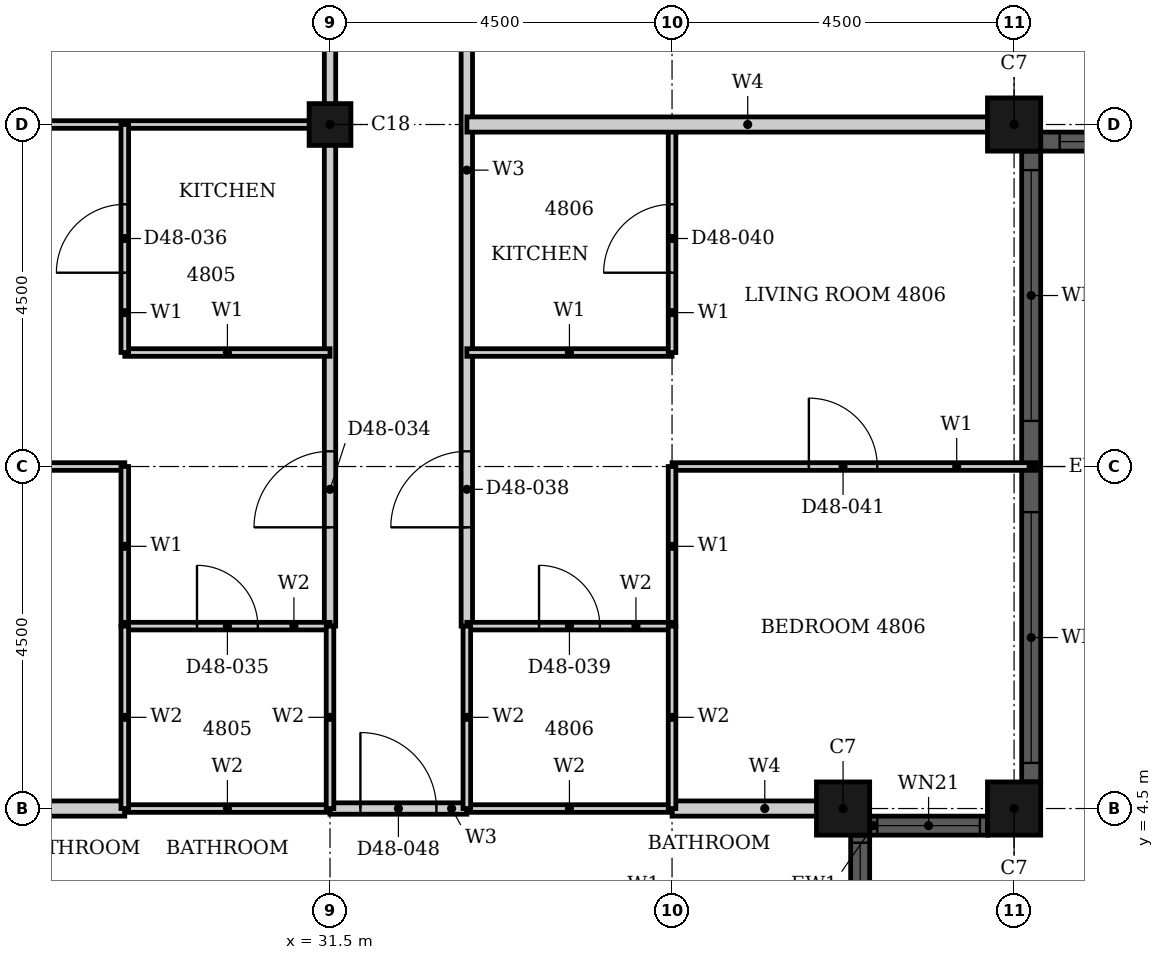
"""IFC4 building model, lengths in metres.
Left out: names, types, materials, properties, quantities, classifications, styles, units other than length and angle.
Written with IfcOpenShell. Run it as: python <this file> out.ifc"""

import sys

from ifc_helpers import new_model, si_unit, direction, frame, frame_2d, origin, origin_2d, place, context, subcontext, project, spatial, rectangle, hollow_rectangle, extrude, element, fill, save


model = new_model("IFC4")
c1 = context("Model", 3, precision=1e-05, world=origin(), true_north=direction((0.0, 1.0)))
c2 = subcontext(c1, "Body", "Model", "MODEL_VIEW")
j1 = project(units=[si_unit("LENGTHUNIT", "METRE"), si_unit("PLANEANGLEUNIT", "RADIAN")], contexts=[c1])
p1 = place(None, origin())
s1 = spatial("IfcSite", under=j1, at=p1, CompositionType="ELEMENT")
p2 = place(p1, origin())
s2 = spatial("IfcBuilding", under=s1, at=p2, CompositionType="ELEMENT")
p3 = place(p2, frame((0.0, 0.0, 192.4)))
s3 = spatial("IfcBuildingStorey", under=s2, at=p3, CompositionType="ELEMENT", Elevation=192.4)
for number, where, z_axis, x_axis in (
    (1, (40.5, 13.5, 0.0), (0.0, 0.0, 1.0), (1.0, 0.0, 0.0)),
    (2, (38.25, 4.5, 0.0), (0.0, 0.0, 1.0), (1.0, 0.0, 0.0)),
    (3, (40.5, 4.5, 0.0), (0.0, 0.0, 1.0), (1.0, 0.0, 0.0)),
):
    element("IfcColumn", number, at=place(p3, frame(where, z_axis=z_axis, x_axis=x_axis)), inside=s3, PredefinedType="COLUMN", context=c2, shape_type="SweptSolid", body=[
        extrude(hollow_rectangle(XDim=0.7, YDim=0.7, WallThickness=0.022, at=origin_2d()), origin(), (0.0, 0.0, 1.0), 3.7),
    ])
p4 = place(p3, frame((31.5, 13.5, 0.0), z_axis=(0.0, 0.0, 1.0), x_axis=(1.0, 0.0, 0.0)))
e4 = element("IfcColumn", 4, at=p4, inside=s3, PredefinedType="COLUMN", context=c2, shape_type="SweptSolid", body=[
    extrude(hollow_rectangle(XDim=0.55, YDim=0.55, WallThickness=0.018, at=origin_2d()), origin(), (0.0, 0.0, 1.0), 3.7),
])
p5 = place(p3, frame((40.85, 13.275, 0.0), z_axis=(0.0, 0.0, 1.0), x_axis=(1.0, 0.0, 0.0)))
e5 = element("IfcWall", 5, at=p5, inside=s3, PredefinedType="SOLIDWALL", context=c2, shape_type="SweptSolid", body=[
    extrude(rectangle(XDim=3.8, YDim=0.25, at=frame_2d((1.9, 0.0))), origin(), (0.0, 0.0, 1.0), 3.7),
])
p6 = place(p5, frame((0.25, 0.0, 0.45)))
e6 = element("IfcOpeningElement", 6, at=p6, cuts=e5, PredefinedType="OPENING", context=c2, shape_type="SweptSolid", body=[
    extrude(rectangle(XDim=3.3, YDim=2.3, at=frame_2d((1.65, 1.15))), frame((0.0, 0.135, 0.0), z_axis=(0.0, -1.0, 0.0), x_axis=(1.0, 0.0, 0.0)), (0.0, 0.0, 1.0), 0.27),
])
p7 = place(p3, frame((38.475, 2.6, 0.0), z_axis=(0.0, 0.0, 1.0), x_axis=(0.0, 1.0, 0.0)))
e7 = element("IfcWall", 7, at=p7, inside=s3, PredefinedType="SOLIDWALL", context=c2, shape_type="SweptSolid", body=[
    extrude(rectangle(XDim=1.55, YDim=0.25, at=frame_2d((0.775, 0.0))), origin(), (0.0, 0.0, 1.0), 3.7),
])
p8 = place(p7, frame((0.1, 0.0, 0.9)))
e8 = element("IfcOpeningElement", 8, at=p8, cuts=e7, PredefinedType="OPENING", context=c2, shape_type="SweptSolid", body=[
    extrude(rectangle(XDim=1.35, YDim=1.85, at=frame_2d((0.675, 0.925))), frame((0.0, 0.135, 0.0), z_axis=(0.0, -1.0, 0.0), x_axis=(1.0, 0.0, 0.0)), (0.0, 0.0, 1.0), 0.27),
])
p9 = place(p3, frame((38.6, 4.275, 0.0), z_axis=(0.0, 0.0, 1.0), x_axis=(1.0, 0.0, 0.0)))
e9 = element("IfcWall", 9, at=p9, inside=s3, PredefinedType="SOLIDWALL", context=c2, shape_type="SweptSolid", body=[
    extrude(rectangle(XDim=1.55, YDim=0.25, at=frame_2d((0.775, 0.0))), origin(), (0.0, 0.0, 1.0), 3.7),
])
p10 = place(p9, frame((0.1, 0.0, 0.9)))
e10 = element("IfcOpeningElement", 10, at=p10, cuts=e9, PredefinedType="OPENING", context=c2, shape_type="SweptSolid", body=[
    extrude(rectangle(XDim=1.35, YDim=1.85, at=frame_2d((0.675, 0.925))), frame((0.0, 0.135, 0.0), z_axis=(0.0, -1.0, 0.0), x_axis=(1.0, 0.0, 0.0)), (0.0, 0.0, 1.0), 0.27),
])
p11 = place(p3, frame((40.725, 4.85, 0.0), z_axis=(0.0, 0.0, 1.0), x_axis=(0.0, 1.0, 0.0)))
e11 = element("IfcWall", 11, at=p11, inside=s3, PredefinedType="SOLIDWALL", context=c2, shape_type="SweptSolid", body=[
    extrude(rectangle(XDim=8.3, YDim=0.25, at=frame_2d((4.15, 0.0))), origin(), (0.0, 0.0, 1.0), 3.7),
])
p12 = place(p11, frame((0.25, 0.0, 0.45)))
e12 = element("IfcOpeningElement", 12, at=p12, cuts=e11, PredefinedType="OPENING", context=c2, shape_type="SweptSolid", body=[
    extrude(rectangle(XDim=3.3, YDim=2.3, at=frame_2d((1.65, 1.15))), frame((0.0, 0.135, 0.0), z_axis=(0.0, -1.0, 0.0), x_axis=(1.0, 0.0, 0.0)), (0.0, 0.0, 1.0), 0.27),
])
p13 = place(p11, frame((4.75, 0.0, 0.45)))
e13 = element("IfcOpeningElement", 13, at=p13, cuts=e11, PredefinedType="OPENING", context=c2, shape_type="SweptSolid", body=[
    extrude(rectangle(XDim=3.3, YDim=2.3, at=frame_2d((1.65, 1.15))), frame((0.0, 0.135, 0.0), z_axis=(0.0, -1.0, 0.0), x_axis=(1.0, 0.0, 0.0)), (0.0, 0.0, 1.0), 0.27),
])
p14 = place(p3, frame((31.5, 4.5, 0.0), z_axis=(0.0, 0.0, 1.0), x_axis=(1.0, 0.0, 0.0)))
e14 = element("IfcWall", 14, at=p14, inside=s3, PredefinedType="PARTITIONING", context=c2, shape_type="SweptSolid", body=[
    extrude(rectangle(XDim=1.8, YDim=0.15, at=frame_2d((0.9, 0.0))), origin(), (0.0, 0.0, 1.0), 3.4),
])
p15 = place(p14, frame((0.4, 0.0, 0.0)))
e15 = element("IfcOpeningElement", 15, at=p15, cuts=e14, PredefinedType="OPENING", context=c2, shape_type="SweptSolid", body=[
    extrude(rectangle(XDim=1.0, YDim=2.2, at=frame_2d((0.5, 1.1))), frame((0.0, 0.085, 0.0), z_axis=(0.0, -1.0, 0.0), x_axis=(1.0, 0.0, 0.0)), (0.0, 0.0, 1.0), 0.17),
])
p16 = place(p3, frame((31.5, 6.9, 0.0), z_axis=(0.0, 0.0, 1.0), x_axis=(0.0, 1.0, 0.0)))
e16 = element("IfcWall", 16, at=p16, inside=s3, PredefinedType="PARTITIONING", context=c2, shape_type="SweptSolid", body=[
    extrude(rectangle(XDim=13.8, YDim=0.15, at=frame_2d((6.9, 0.0))), origin(), (0.0, 0.0, 1.0), 2.68),
])
p17 = place(p16, frame((1.3, 0.0, 0.0)))
e17 = element("IfcOpeningElement", 17, at=p17, cuts=e16, PredefinedType="OPENING", context=c2, shape_type="SweptSolid", body=[
    extrude(rectangle(XDim=1.0, YDim=2.2, at=frame_2d((0.5, 1.1))), frame((0.0, 0.085, 0.0), z_axis=(0.0, -1.0, 0.0), x_axis=(1.0, 0.0, 0.0)), (0.0, 0.0, 1.0), 0.17),
])
p18 = place(p3, frame((33.3, 6.9, 0.0), z_axis=(0.0, 0.0, 1.0), x_axis=(0.0, 1.0, 0.0)))
e18 = element("IfcWall", 18, at=p18, inside=s3, PredefinedType="PARTITIONING", context=c2, shape_type="SweptSolid", body=[
    extrude(rectangle(XDim=13.799, YDim=0.15, at=frame_2d((6.899, 0.0))), origin(), (0.0, 0.0, 1.0), 3.4),
])
p19 = place(p18, frame((9.699, 0.0, 0.0)))
e19 = element("IfcOpeningElement", 19, at=p19, cuts=e18, PredefinedType="OPENING", context=c2, shape_type="SweptSolid", body=[
    extrude(rectangle(XDim=1.0, YDim=2.2, at=frame_2d((0.5, 1.1))), frame((0.0, 0.085, 0.0), z_axis=(0.0, -1.0, 0.0), x_axis=(1.0, 0.0, 0.0)), (0.0, 0.0, 1.0), 0.17),
])
p20 = place(p18, frame((1.3, 0.0, 0.0)))
e20 = element("IfcOpeningElement", 20, at=p20, cuts=e18, PredefinedType="OPENING", context=c2, shape_type="SweptSolid", body=[
    extrude(rectangle(XDim=1.0, YDim=2.2, at=frame_2d((0.5, 1.1))), frame((0.0, 0.085, 0.0), z_axis=(0.0, -1.0, 0.0), x_axis=(1.0, 0.0, 0.0)), (0.0, 0.0, 1.0), 0.17),
])
for number, where, z_axis, x_axis in (
    (21, (33.3, 10.5, 0.0), (0.0, 0.0, 1.0), (1.0, 0.0, 0.0)),
    (22, (28.8, 10.5, 0.0), (0.0, 0.0, 1.0), (1.0, 0.0, 0.0)),
):
    element("IfcWall", number, at=place(p3, frame(where, z_axis=z_axis, x_axis=x_axis)), inside=s3, PredefinedType="PARTITIONING", context=c2, shape_type="SweptSolid", body=[
        extrude(rectangle(XDim=2.7, YDim=0.1, at=frame_2d((1.35, 0.0))), origin(), (0.0, 0.0, 1.0), 3.4),
    ])
p21 = place(p3, frame((22.31, 13.5, 0.0), z_axis=(0.0, 0.0, 1.0), x_axis=(1.0, 0.0, 0.0)))
e23 = element("IfcWall", 23, at=p21, inside=s3, PredefinedType="PARTITIONING", context=c2, shape_type="SweptSolid", body=[
    extrude(rectangle(XDim=9.19, YDim=0.1, at=frame_2d((4.595, 0.0))), origin(), (0.0, 0.0, 1.0), 2.48),
])
p22 = place(p3, frame((36.0, 9.0, 0.0), z_axis=(0.0, 0.0, 1.0), x_axis=(1.0, 0.0, 0.0)))
e24 = element("IfcWall", 24, at=p22, inside=s3, PredefinedType="PARTITIONING", context=c2, shape_type="SweptSolid", body=[
    extrude(rectangle(XDim=4.79, YDim=0.1, at=frame_2d((2.395, 0.0))), origin(), (0.0, 0.0, 1.0), 3.4),
])
p23 = place(p22, frame((1.8, 0.0, 0.0)))
e25 = element("IfcOpeningElement", 25, at=p23, cuts=e24, PredefinedType="OPENING", context=c2, shape_type="SweptSolid", body=[
    extrude(rectangle(XDim=0.9, YDim=2.1, at=frame_2d((0.45, 1.05))), frame((0.0, 0.06, 0.0), z_axis=(0.0, -1.0, 0.0), x_axis=(1.0, 0.0, 0.0)), (0.0, 0.0, 1.0), 0.12),
])
p24 = place(p3, frame((22.21, 9.0, 0.0), z_axis=(0.0, 0.0, 1.0), x_axis=(1.0, 0.0, 0.0)))
e26 = element("IfcWall", 26, at=p24, inside=s3, PredefinedType="PARTITIONING", context=c2, shape_type="SweptSolid", body=[
    extrude(rectangle(XDim=6.59, YDim=0.1, at=frame_2d((3.295, 0.0))), origin(), (0.0, 0.0, 1.0), 3.4),
])
p25 = place(p24, frame((2.7, 0.0, 0.0)))
e27 = element("IfcOpeningElement", 27, at=p25, cuts=e26, PredefinedType="OPENING", context=c2, shape_type="SweptSolid", body=[
    extrude(rectangle(XDim=0.9, YDim=2.1, at=frame_2d((0.45, 1.05))), frame((0.0, 0.06, 0.0), z_axis=(0.0, -1.0, 0.0), x_axis=(1.0, 0.0, 0.0)), (0.0, 0.0, 1.0), 0.12),
])
p26 = place(p3, frame((28.8, 6.9, 0.0), z_axis=(0.0, 0.0, 1.0), x_axis=(0.0, 1.0, 0.0)))
e28 = element("IfcWall", 28, at=p26, inside=s3, PredefinedType="PARTITIONING", context=c2, shape_type="SweptSolid", body=[
    extrude(rectangle(XDim=2.1, YDim=0.1, at=frame_2d((1.05, 0.0))), origin(), (0.0, 0.0, 1.0), 3.4),
])
p27 = place(p3, frame((28.8, 10.5, 0.0), z_axis=(0.0, 0.0, 1.0), x_axis=(0.0, 1.0, 0.0)))
e29 = element("IfcWall", 29, at=p27, inside=s3, PredefinedType="PARTITIONING", context=c2, shape_type="SweptSolid", body=[
    extrude(rectangle(XDim=3.0, YDim=0.1, at=frame_2d((1.5, 0.0))), origin(), (0.0, 0.0, 1.0), 3.4),
])
p28 = place(p27, frame((1.05, 0.0, 0.0)))
e30 = element("IfcOpeningElement", 30, at=p28, cuts=e29, PredefinedType="OPENING", context=c2, shape_type="SweptSolid", body=[
    extrude(rectangle(XDim=0.9, YDim=2.1, at=frame_2d((0.45, 1.05))), frame((0.0, 0.06, 0.0), z_axis=(0.0, -1.0, 0.0), x_axis=(1.0, 0.0, 0.0)), (0.0, 0.0, 1.0), 0.12),
])
p29 = place(p3, frame((36.0, 6.9, 0.0), z_axis=(0.0, 0.0, 1.0), x_axis=(0.0, 1.0, 0.0)))
e31 = element("IfcWall", 31, at=p29, inside=s3, PredefinedType="PARTITIONING", context=c2, shape_type="SweptSolid", body=[
    extrude(rectangle(XDim=2.1, YDim=0.1, at=frame_2d((1.05, 0.0))), origin(), (0.0, 0.0, 1.0), 2.68),
])
p30 = place(p3, frame((36.0, 10.5, 0.0), z_axis=(0.0, 0.0, 1.0), x_axis=(0.0, 1.0, 0.0)))
e32 = element("IfcWall", 32, at=p30, inside=s3, PredefinedType="PARTITIONING", context=c2, shape_type="SweptSolid", body=[
    extrude(rectangle(XDim=3.0, YDim=0.1, at=frame_2d((1.5, 0.0))), origin(), (0.0, 0.0, 1.0), 2.68),
])
p31 = place(p30, frame((1.05, 0.0, 0.0)))
e33 = element("IfcOpeningElement", 33, at=p31, cuts=e32, PredefinedType="OPENING", context=c2, shape_type="SweptSolid", body=[
    extrude(rectangle(XDim=0.9, YDim=2.1, at=frame_2d((0.45, 1.05))), frame((0.0, 0.06, 0.0), z_axis=(0.0, -1.0, 0.0), x_axis=(1.0, 0.0, 0.0)), (0.0, 0.0, 1.0), 0.12),
])
p32 = place(p3, frame((33.301, 13.5, 0.0), z_axis=(0.0, 0.0, 1.0), x_axis=(1.0, 0.0, 0.0)))
e34 = element("IfcWall", 34, at=p32, inside=s3, PredefinedType="PARTITIONING", context=c2, shape_type="SweptSolid", body=[
    extrude(rectangle(XDim=7.389, YDim=0.2, at=frame_2d((3.694, 0.0))), origin(), (0.0, 0.0, 1.0), 2.48),
])
p33 = place(p3, frame((36.0, 4.5, 0.0), z_axis=(0.0, 0.0, 1.0), x_axis=(1.0, 0.0, 0.0)))
e35 = element("IfcWall", 35, at=p33, inside=s3, PredefinedType="PARTITIONING", context=c2, shape_type="SweptSolid", body=[
    extrude(rectangle(XDim=2.44, YDim=0.2, at=frame_2d((1.22, 0.0))), origin(), (0.0, 0.0, 1.0), 3.4),
])
p34 = place(p3, frame((24.56, 4.5, 0.0), z_axis=(0.0, 0.0, 1.0), x_axis=(1.0, 0.0, 0.0)))
e36 = element("IfcWall", 36, at=p34, inside=s3, PredefinedType="PARTITIONING", context=c2, shape_type="SweptSolid", body=[
    extrude(rectangle(XDim=4.24, YDim=0.2, at=frame_2d((2.12, 0.0))), origin(), (0.0, 0.0, 1.0), 3.4),
])
for number, where, z_axis, x_axis in (
    (37, (33.3, 4.5, 0.0), (0.0, 0.0, 1.0), (1.0, 0.0, 0.0)),
    (38, (28.8, 4.5, 0.0), (0.0, 0.0, 1.0), (1.0, 0.0, 0.0)),
):
    element("IfcWall", number, at=place(p3, frame(where, z_axis=z_axis, x_axis=x_axis)), inside=s3, PredefinedType="PARTITIONING", context=c2, shape_type="SweptSolid", body=[
        extrude(rectangle(XDim=2.7, YDim=0.1, at=frame_2d((1.35, 0.0))), origin(), (0.0, 0.0, 1.0), 3.4),
    ])
p35 = place(p3, frame((33.3, 6.9, 0.0), z_axis=(0.0, 0.0, 1.0), x_axis=(1.0, 0.0, 0.0)))
e39 = element("IfcWall", 39, at=p35, inside=s3, PredefinedType="PARTITIONING", context=c2, shape_type="SweptSolid", body=[
    extrude(rectangle(XDim=2.7, YDim=0.1, at=frame_2d((1.35, 0.0))), origin(), (0.0, 0.0, 1.0), 3.4),
])
p36 = place(p35, frame((0.95, 0.0, 0.0)))
e40 = element("IfcOpeningElement", 40, at=p36, cuts=e39, PredefinedType="OPENING", context=c2, shape_type="SweptSolid", body=[
    extrude(rectangle(XDim=0.8, YDim=2.1, at=frame_2d((0.4, 1.05))), frame((0.0, 0.06, 0.0), z_axis=(0.0, -1.0, 0.0), x_axis=(1.0, 0.0, 0.0)), (0.0, 0.0, 1.0), 0.12),
])
p37 = place(p3, frame((28.8, 6.9, 0.0), z_axis=(0.0, 0.0, 1.0), x_axis=(1.0, 0.0, 0.0)))
e41 = element("IfcWall", 41, at=p37, inside=s3, PredefinedType="PARTITIONING", context=c2, shape_type="SweptSolid", body=[
    extrude(rectangle(XDim=2.7, YDim=0.1, at=frame_2d((1.35, 0.0))), origin(), (0.0, 0.0, 1.0), 3.4),
])
p38 = place(p37, frame((0.95, 0.0, 0.0)))
e42 = element("IfcOpeningElement", 42, at=p38, cuts=e41, PredefinedType="OPENING", context=c2, shape_type="SweptSolid", body=[
    extrude(rectangle(XDim=0.8, YDim=2.1, at=frame_2d((0.4, 1.05))), frame((0.0, 0.06, 0.0), z_axis=(0.0, -1.0, 0.0), x_axis=(1.0, 0.0, 0.0)), (0.0, 0.0, 1.0), 0.12),
])
p39 = place(p3, frame((28.8, 4.5, 0.0), z_axis=(0.0, 0.0, 1.0), x_axis=(0.0, 1.0, 0.0)))
e43 = element("IfcWall", 43, at=p39, inside=s3, PredefinedType="PARTITIONING", context=c2, shape_type="SweptSolid", body=[
    extrude(rectangle(XDim=2.4, YDim=0.1, at=frame_2d((1.2, 0.0))), origin(), (0.0, 0.0, 1.0), 3.4),
])
p40 = place(p3, frame((31.5, 4.5, 0.0), z_axis=(0.0, 0.0, 1.0), x_axis=(0.0, 1.0, 0.0)))
e44 = element("IfcWall", 44, at=p40, inside=s3, PredefinedType="PARTITIONING", context=c2, shape_type="SweptSolid", body=[
    extrude(rectangle(XDim=2.4, YDim=0.1, at=frame_2d((1.2, 0.0))), origin(), (0.0, 0.0, 1.0), 2.68),
])
p41 = place(p3, frame((33.3, 4.5, 0.0), z_axis=(0.0, 0.0, 1.0), x_axis=(0.0, 1.0, 0.0)))
e45 = element("IfcWall", 45, at=p41, inside=s3, PredefinedType="PARTITIONING", context=c2, shape_type="SweptSolid", body=[
    extrude(rectangle(XDim=2.4, YDim=0.1, at=frame_2d((1.2, 0.0))), origin(), (0.0, 0.0, 1.0), 3.4),
])
p42 = place(p3, frame((36.0, 4.5, 0.0), z_axis=(0.0, 0.0, 1.0), x_axis=(0.0, 1.0, 0.0)))
e46 = element("IfcWall", 46, at=p42, inside=s3, PredefinedType="PARTITIONING", context=c2, shape_type="SweptSolid", body=[
    extrude(rectangle(XDim=2.4, YDim=0.1, at=frame_2d((1.2, 0.0))), origin(), (0.0, 0.0, 1.0), 2.68),
])
p43 = place(p6, origin())
e47 = element("IfcWindow", 47, at=p43, inside=s3, PartitioningType="SINGLE_PANEL", PredefinedType="WINDOW", context=c2, shape_type="SweptSolid", body=[
    extrude(rectangle(XDim=3.3, YDim=2.3, at=frame_2d((1.65, 1.15))), frame((0.0, 0.03, 0.0), z_axis=(0.0, -1.0, 0.0), x_axis=(1.0, 0.0, 0.0)), (0.0, 0.0, 1.0), 0.06),
])
fill(e6, e47)
p44 = place(p8, origin())
e48 = element("IfcWindow", 48, at=p44, inside=s3, PartitioningType="SINGLE_PANEL", PredefinedType="WINDOW", context=c2, shape_type="SweptSolid", body=[
    extrude(rectangle(XDim=1.35, YDim=1.85, at=frame_2d((0.675, 0.925))), frame((0.0, 0.03, 0.0), z_axis=(0.0, -1.0, 0.0), x_axis=(1.0, 0.0, 0.0)), (0.0, 0.0, 1.0), 0.06),
])
fill(e8, e48)
p45 = place(p10, origin())
e49 = element("IfcWindow", 49, at=p45, inside=s3, PartitioningType="SINGLE_PANEL", PredefinedType="WINDOW", context=c2, shape_type="SweptSolid", body=[
    extrude(rectangle(XDim=1.35, YDim=1.85, at=frame_2d((0.675, 0.925))), frame((0.0, 0.03, 0.0), z_axis=(0.0, -1.0, 0.0), x_axis=(1.0, 0.0, 0.0)), (0.0, 0.0, 1.0), 0.06),
])
fill(e10, e49)
p46 = place(p12, origin())
e50 = element("IfcWindow", 50, at=p46, inside=s3, PartitioningType="SINGLE_PANEL", PredefinedType="WINDOW", context=c2, shape_type="SweptSolid", body=[
    extrude(rectangle(XDim=3.3, YDim=2.3, at=frame_2d((1.65, 1.15))), frame((0.0, 0.03, 0.0), z_axis=(0.0, -1.0, 0.0), x_axis=(1.0, 0.0, 0.0)), (0.0, 0.0, 1.0), 0.06),
])
fill(e12, e50)
p47 = place(p13, origin())
e51 = element("IfcWindow", 51, at=p47, inside=s3, PartitioningType="SINGLE_PANEL", PredefinedType="WINDOW", context=c2, shape_type="SweptSolid", body=[
    extrude(rectangle(XDim=3.3, YDim=2.3, at=frame_2d((1.65, 1.15))), frame((0.0, 0.03, 0.0), z_axis=(0.0, -1.0, 0.0), x_axis=(1.0, 0.0, 0.0)), (0.0, 0.0, 1.0), 0.06),
])
fill(e13, e51)
p48 = place(p17, origin())
e52 = element("IfcDoor", 52, at=p48, inside=s3, OperationType="SINGLE_SWING_LEFT", PredefinedType="DOOR", context=c2, shape_type="SweptSolid", body=[
    extrude(rectangle(XDim=1.0, YDim=2.2, at=frame_2d((0.5, 1.1))), frame((0.0, 0.025, 0.0), z_axis=(0.0, -1.0, 0.0), x_axis=(1.0, 0.0, 0.0)), (0.0, 0.0, 1.0), 0.05),
])
fill(e17, e52)
p49 = place(p38, origin())
e53 = element("IfcDoor", 53, at=p49, inside=s3, OperationType="SINGLE_SWING_LEFT", PredefinedType="DOOR", context=c2, shape_type="SweptSolid", body=[
    extrude(rectangle(XDim=0.8, YDim=2.1, at=frame_2d((0.4, 1.05))), frame((0.0, 0.025, 0.0), z_axis=(0.0, -1.0, 0.0), x_axis=(1.0, 0.0, 0.0)), (0.0, 0.0, 1.0), 0.05),
])
fill(e42, e53)
p50 = place(p28, origin())
e54 = element("IfcDoor", 54, at=p50, inside=s3, OperationType="SINGLE_SWING_LEFT", PredefinedType="DOOR", context=c2, shape_type="SweptSolid", body=[
    extrude(rectangle(XDim=0.9, YDim=2.1, at=frame_2d((0.45, 1.05))), frame((0.0, 0.025, 0.0), z_axis=(0.0, -1.0, 0.0), x_axis=(1.0, 0.0, 0.0)), (0.0, 0.0, 1.0), 0.05),
])
fill(e30, e54)
p51 = place(p20, origin())
e55 = element("IfcDoor", 55, at=p51, inside=s3, OperationType="SINGLE_SWING_RIGHT", PredefinedType="DOOR", context=c2, shape_type="SweptSolid", body=[
    extrude(rectangle(XDim=1.0, YDim=2.2, at=frame_2d((0.5, 1.1))), frame((0.0, 0.025, 0.0), z_axis=(0.0, -1.0, 0.0), x_axis=(1.0, 0.0, 0.0)), (0.0, 0.0, 1.0), 0.05),
])
fill(e20, e55)
p52 = place(p36, origin())
e56 = element("IfcDoor", 56, at=p52, inside=s3, OperationType="SINGLE_SWING_RIGHT", PredefinedType="DOOR", context=c2, shape_type="SweptSolid", body=[
    extrude(rectangle(XDim=0.8, YDim=2.1, at=frame_2d((0.4, 1.05))), frame((0.0, 0.025, 0.0), z_axis=(0.0, -1.0, 0.0), x_axis=(1.0, 0.0, 0.0)), (0.0, 0.0, 1.0), 0.05),
])
fill(e40, e56)
p53 = place(p31, origin())
e57 = element("IfcDoor", 57, at=p53, inside=s3, OperationType="SINGLE_SWING_LEFT", PredefinedType="DOOR", context=c2, shape_type="SweptSolid", body=[
    extrude(rectangle(XDim=0.9, YDim=2.1, at=frame_2d((0.45, 1.05))), frame((0.0, 0.025, 0.0), z_axis=(0.0, -1.0, 0.0), x_axis=(1.0, 0.0, 0.0)), (0.0, 0.0, 1.0), 0.05),
])
fill(e33, e57)
p54 = place(p23, origin())
e58 = element("IfcDoor", 58, at=p54, inside=s3, OperationType="SINGLE_SWING_LEFT", PredefinedType="DOOR", context=c2, shape_type="SweptSolid", body=[
    extrude(rectangle(XDim=0.9, YDim=2.1, at=frame_2d((0.45, 1.05))), frame((0.0, 0.025, 0.0), z_axis=(0.0, -1.0, 0.0), x_axis=(1.0, 0.0, 0.0)), (0.0, 0.0, 1.0), 0.05),
])
fill(e25, e58)
p55 = place(p15, origin())
e59 = element("IfcDoor", 59, at=p55, inside=s3, OperationType="SINGLE_SWING_RIGHT", PredefinedType="DOOR", context=c2, shape_type="SweptSolid", body=[
    extrude(rectangle(XDim=1.0, YDim=2.2, at=frame_2d((0.5, 1.1))), frame((0.0, 0.025, 0.0), z_axis=(0.0, -1.0, 0.0), x_axis=(1.0, 0.0, 0.0)), (0.0, 0.0, 1.0), 0.05),
])
fill(e15, e59)
save(model, sys.argv[1])
